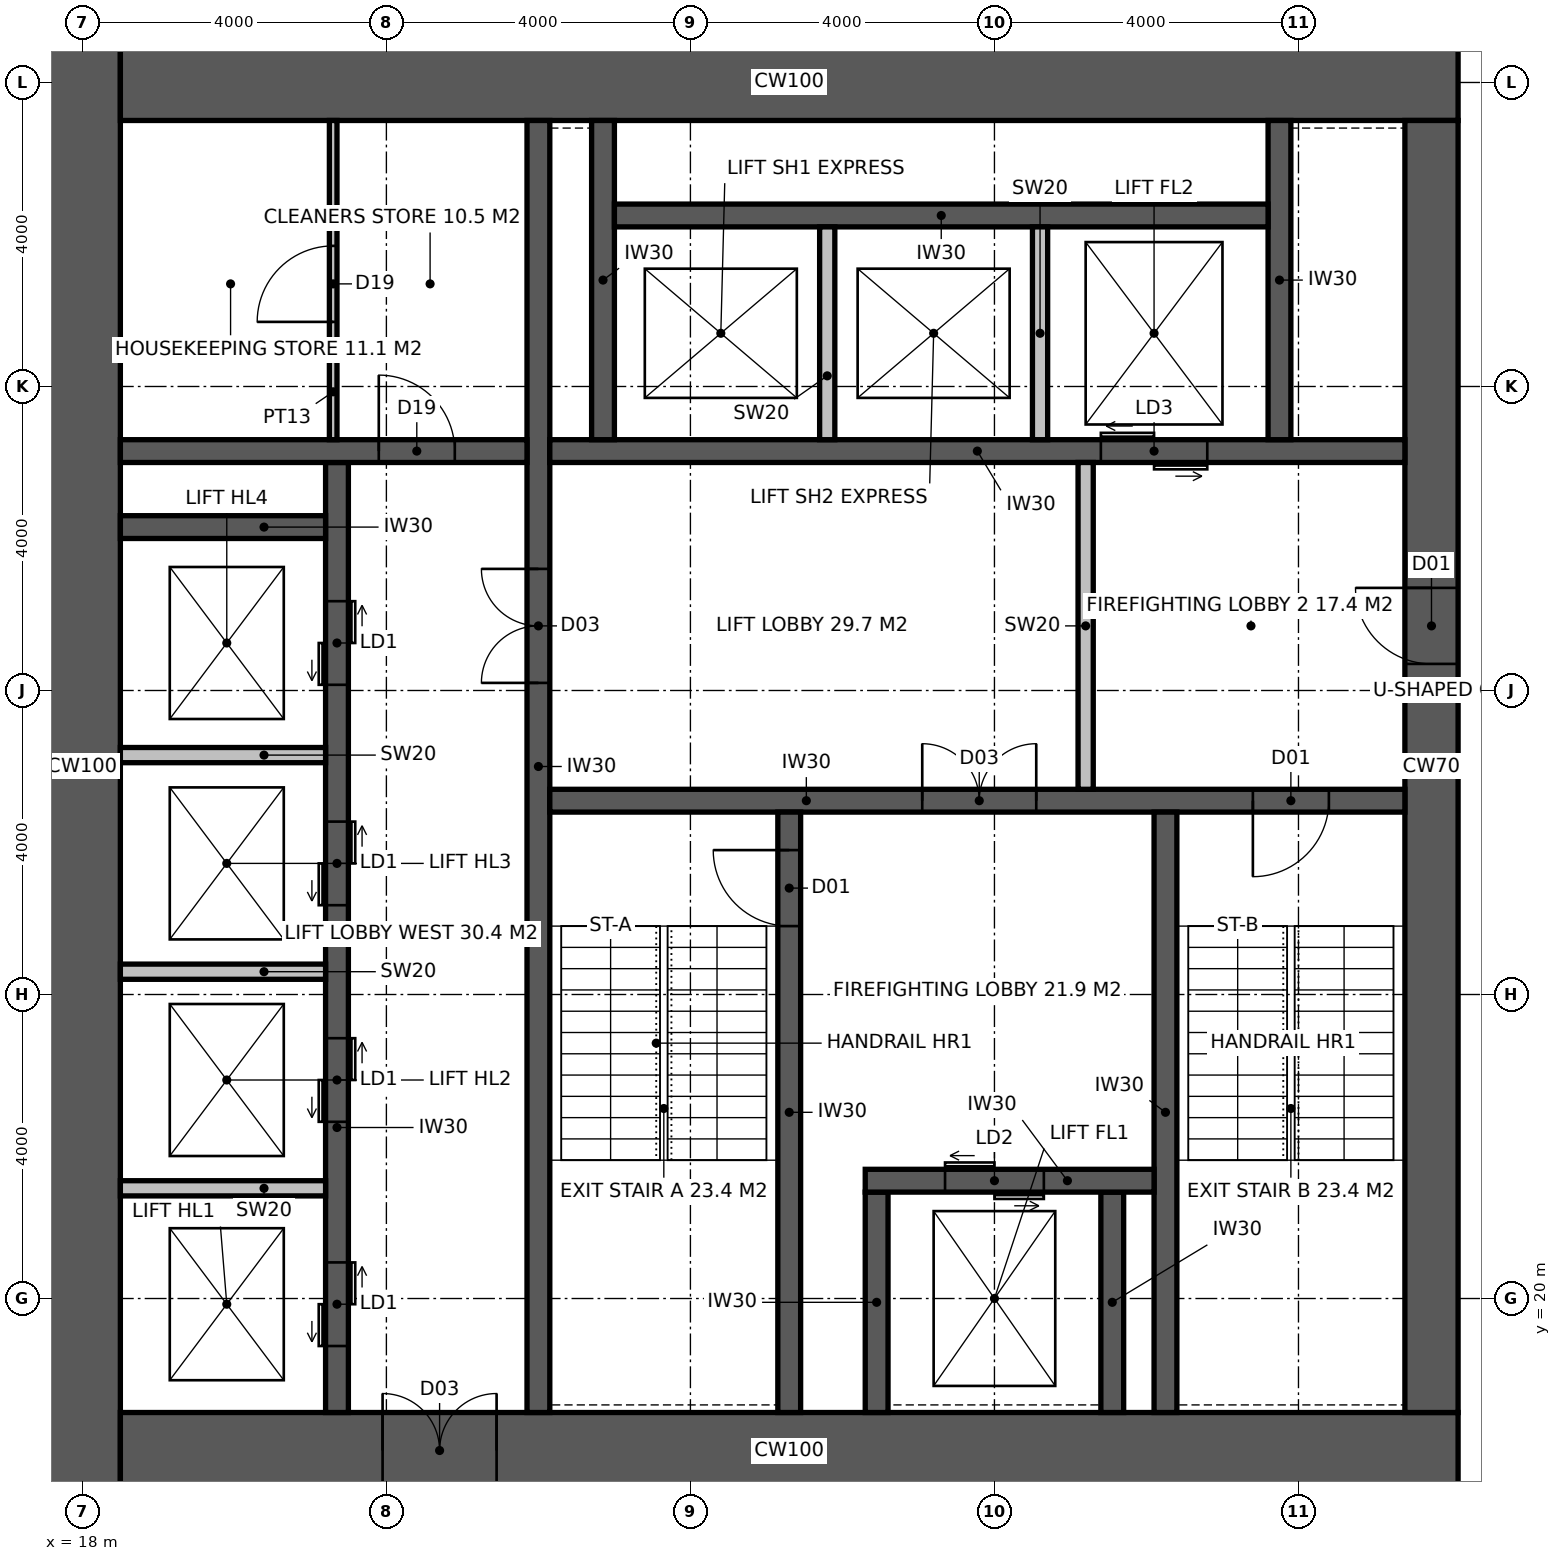
"""IFC4 building model, lengths in metres.
Left out: names, types, materials, properties, quantities, classifications, styles, units other than length and angle.
Written with IfcOpenShell. Run it as: python <this file> out.ifc"""

import sys

from ifc_helpers import new_model, si_unit, direction, frame, frame_2d, origin, place, context, subcontext, project, spatial, rectangle, extrude, element, fill, save


model = new_model("IFC4")
c1 = context("Model", 3, precision=1e-05, world=origin(), true_north=direction((0.0, 1.0)))
c2 = subcontext(c1, "Body", "Model", "MODEL_VIEW")
j1 = project(units=[si_unit("LENGTHUNIT", "METRE"), si_unit("PLANEANGLEUNIT", "RADIAN")], contexts=[c1])
p1 = place(None, origin())
s1 = spatial("IfcSite", under=j1, at=p1, CompositionType="ELEMENT")
p2 = place(p1, origin())
s2 = spatial("IfcBuilding", under=s1, at=p2, CompositionType="ELEMENT")
p3 = place(p2, frame((0.0, 0.0, 159.8)))
s3 = spatial("IfcBuildingStorey", under=s2, at=p3, CompositionType="ELEMENT", Elevation=159.8)
p4 = place(p3, frame((18.0, 17.5, -0.15), z_axis=(0.0, 0.0, 1.0), x_axis=(0.0, 1.0, 0.0)))
e1 = element("IfcWall", 1, at=p4, inside=s3, PredefinedType="SHEAR", context=c2, shape_type="SweptSolid", body=[
    extrude(rectangle(XDim=19.0, YDim=1.0, at=frame_2d((9.5, 0.0))), origin(), (0.0, 0.0, 1.0), 4.0),
])
p5 = place(p3, frame((18.5, 18.0, -0.15), z_axis=(0.0, 0.0, 1.0), x_axis=(1.0, 0.0, 0.0)))
e2 = element("IfcWall", 2, at=p5, inside=s3, PredefinedType="SHEAR", context=c2, shape_type="SweptSolid", body=[
    extrude(rectangle(XDim=17.6, YDim=1.0, at=frame_2d((8.8, 0.0))), origin(), (0.0, 0.0, 1.0), 4.0),
])
p6 = place(p5, frame((3.45, 0.0, 0.15)))
e3 = element("IfcOpeningElement", 3, at=p6, cuts=e2, PredefinedType="OPENING", context=c2, shape_type="SweptSolid", body=[
    extrude(rectangle(XDim=1.5, YDim=2.4, at=frame_2d((0.75, 1.2))), frame((0.0, 0.51, 0.0), z_axis=(0.0, -1.0, 0.0), x_axis=(1.0, 0.0, 0.0)), (0.0, 0.0, 1.0), 1.02),
])
p7 = place(p3, frame((18.5, 36.0, -0.15), z_axis=(0.0, 0.0, 1.0), x_axis=(1.0, 0.0, 0.0)))
e4 = element("IfcWall", 4, at=p7, inside=s3, PredefinedType="SHEAR", context=c2, shape_type="SweptSolid", body=[
    extrude(rectangle(XDim=17.6, YDim=1.0, at=frame_2d((8.8, 0.0))), origin(), (0.0, 0.0, 1.0), 4.0),
])
p8 = place(p3, frame((35.75, 18.5, -0.15), z_axis=(0.0, 0.0, 1.0), x_axis=(0.0, 1.0, 0.0)))
e5 = element("IfcWall", 5, at=p8, inside=s3, PredefinedType="SHEAR", context=c2, shape_type="SweptSolid", body=[
    extrude(rectangle(XDim=17.0, YDim=0.7, at=frame_2d((8.5, 0.0))), origin(), (0.0, 0.0, 1.0), 4.0),
])
p9 = place(p8, frame((9.85, 0.0, 0.15)))
e6 = element("IfcOpeningElement", 6, at=p9, cuts=e5, PredefinedType="OPENING", context=c2, shape_type="SweptSolid", body=[
    extrude(rectangle(XDim=1.0, YDim=2.2, at=frame_2d((0.5, 1.1))), frame((0.0, 0.36, 0.0), z_axis=(0.0, -1.0, 0.0), x_axis=(1.0, 0.0, 0.0)), (0.0, 0.0, 1.0), 0.72),
])
p10 = place(p3, frame((24.0, 18.5, -0.15), z_axis=(0.0, 0.0, 1.0), x_axis=(0.0, 1.0, 0.0)))
e7 = element("IfcWall", 7, at=p10, inside=s3, PredefinedType="SHEAR", context=c2, shape_type="SweptSolid", body=[
    extrude(rectangle(XDim=17.0, YDim=0.3, at=frame_2d((8.5, 0.0))), origin(), (0.0, 0.0, 1.0), 4.0),
])
p11 = place(p10, frame((9.6, 0.0, 0.15)))
e8 = element("IfcOpeningElement", 8, at=p11, cuts=e7, PredefinedType="OPENING", context=c2, shape_type="SweptSolid", body=[
    extrude(rectangle(XDim=1.5, YDim=2.4, at=frame_2d((0.75, 1.2))), frame((0.0, 0.16, 0.0), z_axis=(0.0, -1.0, 0.0), x_axis=(1.0, 0.0, 0.0)), (0.0, 0.0, 1.0), 0.32),
])
p12 = place(p3, frame((24.15, 26.55, -0.15), z_axis=(0.0, 0.0, 1.0), x_axis=(1.0, 0.0, 0.0)))
e9 = element("IfcWall", 9, at=p12, inside=s3, PredefinedType="SHEAR", context=c2, shape_type="SweptSolid", body=[
    extrude(rectangle(XDim=11.25, YDim=0.3, at=frame_2d((5.625, 0.0))), origin(), (0.0, 0.0, 1.0), 4.0),
])
p13 = place(p12, frame((9.25, 0.0, 0.15)))
e10 = element("IfcOpeningElement", 10, at=p13, cuts=e9, PredefinedType="OPENING", context=c2, shape_type="SweptSolid", body=[
    extrude(rectangle(XDim=1.0, YDim=2.2, at=frame_2d((0.5, 1.1))), frame((0.0, 0.16, 0.0), z_axis=(0.0, -1.0, 0.0), x_axis=(1.0, 0.0, 0.0)), (0.0, 0.0, 1.0), 0.32),
])
p14 = place(p12, frame((4.9, 0.0, 0.15)))
e11 = element("IfcOpeningElement", 11, at=p14, cuts=e9, PredefinedType="OPENING", context=c2, shape_type="SweptSolid", body=[
    extrude(rectangle(XDim=1.5, YDim=2.4, at=frame_2d((0.75, 1.2))), frame((0.0, 0.16, 0.0), z_axis=(0.0, -1.0, 0.0), x_axis=(1.0, 0.0, 0.0)), (0.0, 0.0, 1.0), 0.32),
])
p15 = place(p3, frame((27.3, 18.5, -0.15), z_axis=(0.0, 0.0, 1.0), x_axis=(0.0, 1.0, 0.0)))
e12 = element("IfcWall", 12, at=p15, inside=s3, PredefinedType="SHEAR", context=c2, shape_type="SweptSolid", body=[
    extrude(rectangle(XDim=7.9, YDim=0.3, at=frame_2d((3.95, 0.0))), origin(), (0.0, 0.0, 1.0), 4.0),
])
p16 = place(p15, frame((6.4, 0.0, 0.15)))
e13 = element("IfcOpeningElement", 13, at=p16, cuts=e12, PredefinedType="OPENING", context=c2, shape_type="SweptSolid", body=[
    extrude(rectangle(XDim=1.0, YDim=2.2, at=frame_2d((0.5, 1.1))), frame((0.0, 0.16, 0.0), z_axis=(0.0, -1.0, 0.0), x_axis=(1.0, 0.0, 0.0)), (0.0, 0.0, 1.0), 0.32),
])
p17 = place(p3, frame((32.25, 18.5, -0.15), z_axis=(0.0, 0.0, 1.0), x_axis=(0.0, 1.0, 0.0)))
e14 = element("IfcWall", 14, at=p17, inside=s3, PredefinedType="SHEAR", context=c2, shape_type="SweptSolid", body=[
    extrude(rectangle(XDim=7.9, YDim=0.3, at=frame_2d((3.95, 0.0))), origin(), (0.0, 0.0, 1.0), 4.0),
])
for number, where, z_axis, x_axis in (
    (15, (28.45, 18.5, -0.15), (0.0, 0.0, 1.0), (0.0, 1.0, 0.0)),
    (16, (31.55, 18.5, -0.15), (0.0, 0.0, 1.0), (0.0, 1.0, 0.0)),
):
    element("IfcWall", number, at=place(p3, frame(where, z_axis=z_axis, x_axis=x_axis)), inside=s3, PredefinedType="SHEAR", context=c2, shape_type="SweptSolid", body=[
        extrude(rectangle(XDim=2.9, YDim=0.3, at=frame_2d((1.45, 0.0))), origin(), (0.0, 0.0, 1.0), 4.0),
    ])
p18 = place(p3, frame((28.3, 21.55, -0.15), z_axis=(0.0, 0.0, 1.0), x_axis=(1.0, 0.0, 0.0)))
e17 = element("IfcWall", 17, at=p18, inside=s3, PredefinedType="SHEAR", context=c2, shape_type="SweptSolid", body=[
    extrude(rectangle(XDim=3.8, YDim=0.3, at=frame_2d((1.9, 0.0))), origin(), (0.0, 0.0, 1.0), 4.0),
])
p19 = place(p18, frame((1.05, 0.0, 0.15)))
e18 = element("IfcOpeningElement", 18, at=p19, cuts=e17, PredefinedType="OPENING", context=c2, shape_type="SweptSolid", body=[
    extrude(rectangle(XDim=1.3, YDim=2.4, at=frame_2d((0.65, 1.2))), frame((0.0, 0.16, 0.0), z_axis=(0.0, -1.0, 0.0), x_axis=(1.0, 0.0, 0.0)), (0.0, 0.0, 1.0), 0.32),
])
p20 = place(p3, frame((24.15, 31.15, -0.15), z_axis=(0.0, 0.0, 1.0), x_axis=(1.0, 0.0, 0.0)))
e19 = element("IfcWall", 19, at=p20, inside=s3, PredefinedType="SHEAR", context=c2, shape_type="SweptSolid", body=[
    extrude(rectangle(XDim=11.25, YDim=0.3, at=frame_2d((5.625, 0.0))), origin(), (0.0, 0.0, 1.0), 4.0),
])
p21 = place(p20, frame((7.25, 0.0, 0.15)))
e20 = element("IfcOpeningElement", 20, at=p21, cuts=e19, PredefinedType="OPENING", context=c2, shape_type="SweptSolid", body=[
    extrude(rectangle(XDim=1.4, YDim=2.4, at=frame_2d((0.7, 1.2))), frame((0.0, 0.16, 0.0), z_axis=(0.0, -1.0, 0.0), x_axis=(1.0, 0.0, 0.0)), (0.0, 0.0, 1.0), 0.32),
])
p22 = place(p3, frame((21.35, 18.5, -0.15), z_axis=(0.0, 0.0, 1.0), x_axis=(0.0, 1.0, 0.0)))
e21 = element("IfcWall", 21, at=p22, inside=s3, PredefinedType="SHEAR", context=c2, shape_type="SweptSolid", body=[
    extrude(rectangle(XDim=12.5, YDim=0.3, at=frame_2d((6.25, 0.0))), origin(), (0.0, 0.0, 1.0), 4.0),
])
p23 = place(p22, frame((0.875, 0.0, 0.15)))
e22 = element("IfcOpeningElement", 22, at=p23, cuts=e21, PredefinedType="OPENING", context=c2, shape_type="SweptSolid", body=[
    extrude(rectangle(XDim=1.1, YDim=2.2, at=frame_2d((0.55, 1.1))), frame((0.0, 0.16, 0.0), z_axis=(0.0, -1.0, 0.0), x_axis=(1.0, 0.0, 0.0)), (0.0, 0.0, 1.0), 0.32),
])
p24 = place(p22, frame((3.825, 0.0, 0.15)))
e23 = element("IfcOpeningElement", 23, at=p24, cuts=e21, PredefinedType="OPENING", context=c2, shape_type="SweptSolid", body=[
    extrude(rectangle(XDim=1.1, YDim=2.2, at=frame_2d((0.55, 1.1))), frame((0.0, 0.16, 0.0), z_axis=(0.0, -1.0, 0.0), x_axis=(1.0, 0.0, 0.0)), (0.0, 0.0, 1.0), 0.32),
])
p25 = place(p22, frame((6.675, 0.0, 0.15)))
e24 = element("IfcOpeningElement", 24, at=p25, cuts=e21, PredefinedType="OPENING", context=c2, shape_type="SweptSolid", body=[
    extrude(rectangle(XDim=1.1, YDim=2.2, at=frame_2d((0.55, 1.1))), frame((0.0, 0.16, 0.0), z_axis=(0.0, -1.0, 0.0), x_axis=(1.0, 0.0, 0.0)), (0.0, 0.0, 1.0), 0.32),
])
p26 = place(p22, frame((9.575, 0.0, 0.15)))
e25 = element("IfcOpeningElement", 25, at=p26, cuts=e21, PredefinedType="OPENING", context=c2, shape_type="SweptSolid", body=[
    extrude(rectangle(XDim=1.1, YDim=2.2, at=frame_2d((0.55, 1.1))), frame((0.0, 0.16, 0.0), z_axis=(0.0, -1.0, 0.0), x_axis=(1.0, 0.0, 0.0)), (0.0, 0.0, 1.0), 0.32),
])
p27 = place(p3, frame((18.5, 31.15, -0.15), z_axis=(0.0, 0.0, 1.0), x_axis=(1.0, 0.0, 0.0)))
e26 = element("IfcWall", 26, at=p27, inside=s3, PredefinedType="SHEAR", context=c2, shape_type="SweptSolid", body=[
    extrude(rectangle(XDim=5.35, YDim=0.3, at=frame_2d((2.675, 0.0))), origin(), (0.0, 0.0, 1.0), 4.0),
])
p28 = place(p27, frame((3.4, 0.0, 0.15)))
e27 = element("IfcOpeningElement", 27, at=p28, cuts=e26, PredefinedType="OPENING", context=c2, shape_type="SweptSolid", body=[
    extrude(rectangle(XDim=1.0, YDim=2.2, at=frame_2d((0.5, 1.1))), frame((0.0, 0.16, 0.0), z_axis=(0.0, -1.0, 0.0), x_axis=(1.0, 0.0, 0.0)), (0.0, 0.0, 1.0), 0.32),
])
p29 = place(p3, frame((18.5, 30.15, -0.15), z_axis=(0.0, 0.0, 1.0), x_axis=(1.0, 0.0, 0.0)))
e28 = element("IfcWall", 28, at=p29, inside=s3, PredefinedType="SHEAR", context=c2, shape_type="SweptSolid", body=[
    extrude(rectangle(XDim=2.7, YDim=0.3, at=frame_2d((1.35, 0.0))), origin(), (0.0, 0.0, 1.0), 4.0),
])
for number, where, z_axis, x_axis in (
    (29, (24.85, 31.3, -0.15), (0.0, 0.0, 1.0), (0.0, 1.0, 0.0)),
    (30, (33.75, 31.3, -0.15), (0.0, 0.0, 1.0), (0.0, 1.0, 0.0)),
):
    element("IfcWall", number, at=place(p3, frame(where, z_axis=z_axis, x_axis=x_axis)), inside=s3, PredefinedType="SHEAR", context=c2, shape_type="SweptSolid", body=[
        extrude(rectangle(XDim=4.2, YDim=0.3, at=frame_2d((2.1, 0.0))), origin(), (0.0, 0.0, 1.0), 4.0),
    ])
p30 = place(p3, frame((25.0, 34.25, -0.15), z_axis=(0.0, 0.0, 1.0), x_axis=(1.0, 0.0, 0.0)))
e31 = element("IfcWall", 31, at=p30, inside=s3, PredefinedType="SHEAR", context=c2, shape_type="SweptSolid", body=[
    extrude(rectangle(XDim=8.6, YDim=0.3, at=frame_2d((4.3, 0.0))), origin(), (0.0, 0.0, 1.0), 4.0),
])
for number, where, z_axis, x_axis in (
    (32, (27.8, 31.3, -0.15), (0.0, 0.0, 1.0), (0.0, 1.0, 0.0)),
    (33, (30.6, 31.3, -0.15), (0.0, 0.0, 1.0), (0.0, 1.0, 0.0)),
):
    element("IfcWall", number, at=place(p3, frame(where, z_axis=z_axis, x_axis=x_axis)), inside=s3, PredefinedType="SOLIDWALL", context=c2, shape_type="SweptSolid", body=[
        extrude(rectangle(XDim=2.8, YDim=0.2, at=frame_2d((1.4, 0.0))), origin(), (0.0, 0.0, 1.0), 4.0),
    ])
for number, where, z_axis, x_axis in (
    (34, (18.5, 21.45, -0.15), (0.0, 0.0, 1.0), (1.0, 0.0, 0.0)),
    (35, (18.5, 24.3, -0.15), (0.0, 0.0, 1.0), (1.0, 0.0, 0.0)),
    (36, (18.5, 27.15, -0.15), (0.0, 0.0, 1.0), (1.0, 0.0, 0.0)),
):
    element("IfcWall", number, at=place(p3, frame(where, z_axis=z_axis, x_axis=x_axis)), inside=s3, PredefinedType="SOLIDWALL", context=c2, shape_type="SweptSolid", body=[
        extrude(rectangle(XDim=2.7, YDim=0.2, at=frame_2d((1.35, 0.0))), origin(), (0.0, 0.0, 1.0), 4.0),
    ])
p31 = place(p3, frame((31.2, 26.7, 0.0), z_axis=(0.0, 0.0, 1.0), x_axis=(0.0, 1.0, 0.0)))
e37 = element("IfcWall", 37, at=p31, inside=s3, PredefinedType="SOLIDWALL", context=c2, shape_type="SweptSolid", body=[
    extrude(rectangle(XDim=4.3, YDim=0.2, at=frame_2d((2.15, 0.0))), origin(), (0.0, 0.0, 1.0), 3.85),
])
p32 = place(p3, frame((21.3, 31.3, 0.0), z_axis=(0.0, 0.0, 1.0), x_axis=(0.0, 1.0, 0.0)))
e38 = element("IfcWall", 38, at=p32, inside=s3, PredefinedType="PARTITIONING", context=c2, shape_type="SweptSolid", body=[
    extrude(rectangle(XDim=4.2, YDim=0.1, at=frame_2d((2.1, 0.0))), origin(), (0.0, 0.0, 1.0), 3.85),
])
p33 = place(p32, frame((1.55, 0.0, 0.0)))
e39 = element("IfcOpeningElement", 39, at=p33, cuts=e38, PredefinedType="OPENING", context=c2, shape_type="SweptSolid", body=[
    extrude(rectangle(XDim=1.0, YDim=2.2, at=frame_2d((0.5, 1.1))), frame((0.0, 0.06, 0.0), z_axis=(0.0, -1.0, 0.0), x_axis=(1.0, 0.0, 0.0)), (0.0, 0.0, 1.0), 0.12),
])
p34 = place(p16, origin())
e40 = element("IfcDoor", 40, at=p34, inside=s3, OperationType="SINGLE_SWING_RIGHT", PredefinedType="DOOR", context=c2, shape_type="SweptSolid", body=[
    extrude(rectangle(XDim=1.0, YDim=2.2, at=frame_2d((0.5, 1.1))), frame((0.0, 0.025, 0.0), z_axis=(0.0, -1.0, 0.0), x_axis=(1.0, 0.0, 0.0)), (0.0, 0.0, 1.0), 0.05),
])
fill(e13, e40)
p35 = place(p13, frame((1.0, 0.0, 0.0), z_axis=(0.0, 0.0, 1.0), x_axis=(-1.0, 0.0, 0.0)))
e41 = element("IfcDoor", 41, at=p35, inside=s3, OperationType="SINGLE_SWING_RIGHT", PredefinedType="DOOR", context=c2, shape_type="SweptSolid", body=[
    extrude(rectangle(XDim=1.0, YDim=2.2, at=frame_2d((0.5, 1.1))), frame((0.0, 0.025, 0.0), z_axis=(0.0, -1.0, 0.0), x_axis=(1.0, 0.0, 0.0)), (0.0, 0.0, 1.0), 0.05),
])
fill(e10, e41)
p36 = place(p9, origin())
e42 = element("IfcDoor", 42, at=p36, inside=s3, OperationType="SINGLE_SWING_RIGHT", PredefinedType="DOOR", context=c2, shape_type="SweptSolid", body=[
    extrude(rectangle(XDim=1.0, YDim=2.2, at=frame_2d((0.5, 1.1))), frame((0.0, 0.025, 0.0), z_axis=(0.0, -1.0, 0.0), x_axis=(1.0, 0.0, 0.0)), (0.0, 0.0, 1.0), 0.05),
])
fill(e6, e42)
p37 = place(p14, origin())
e43 = element("IfcDoor", 43, at=p37, inside=s3, OperationType="DOUBLE_DOOR_DOUBLE_SWING", PredefinedType="DOOR", context=c2, shape_type="SweptSolid", body=[
    extrude(rectangle(XDim=1.5, YDim=2.4, at=frame_2d((0.75, 1.2))), frame((0.0, 0.025, 0.0), z_axis=(0.0, -1.0, 0.0), x_axis=(1.0, 0.0, 0.0)), (0.0, 0.0, 1.0), 0.05),
])
fill(e11, e43)
p38 = place(p11, origin())
e44 = element("IfcDoor", 44, at=p38, inside=s3, OperationType="DOUBLE_DOOR_DOUBLE_SWING", PredefinedType="DOOR", context=c2, shape_type="SweptSolid", body=[
    extrude(rectangle(XDim=1.5, YDim=2.4, at=frame_2d((0.75, 1.2))), frame((0.0, 0.025, 0.0), z_axis=(0.0, -1.0, 0.0), x_axis=(1.0, 0.0, 0.0)), (0.0, 0.0, 1.0), 0.05),
])
fill(e8, e44)
p39 = place(p28, origin())
e45 = element("IfcDoor", 45, at=p39, inside=s3, OperationType="SINGLE_SWING_LEFT", PredefinedType="DOOR", context=c2, shape_type="SweptSolid", body=[
    extrude(rectangle(XDim=1.0, YDim=2.2, at=frame_2d((0.5, 1.1))), frame((0.0, 0.025, 0.0), z_axis=(0.0, -1.0, 0.0), x_axis=(1.0, 0.0, 0.0)), (0.0, 0.0, 1.0), 0.05),
])
fill(e27, e45)
p40 = place(p33, origin())
e46 = element("IfcDoor", 46, at=p40, inside=s3, OperationType="SINGLE_SWING_LEFT", PredefinedType="DOOR", context=c2, shape_type="SweptSolid", body=[
    extrude(rectangle(XDim=1.0, YDim=2.2, at=frame_2d((0.5, 1.1))), frame((0.0, 0.025, 0.0), z_axis=(0.0, -1.0, 0.0), x_axis=(1.0, 0.0, 0.0)), (0.0, 0.0, 1.0), 0.05),
])
fill(e39, e46)
p41 = place(p6, origin())
e47 = element("IfcDoor", 47, at=p41, inside=s3, OperationType="DOUBLE_DOOR_DOUBLE_SWING", PredefinedType="DOOR", context=c2, shape_type="SweptSolid", body=[
    extrude(rectangle(XDim=1.5, YDim=2.4, at=frame_2d((0.75, 1.2))), frame((0.0, 0.025, 0.0), z_axis=(0.0, -1.0, 0.0), x_axis=(1.0, 0.0, 0.0)), (0.0, 0.0, 1.0), 0.05),
])
fill(e3, e47)
p42 = place(p19, origin())
e48 = element("IfcDoor", 48, at=p42, inside=s3, OperationType="DOUBLE_DOOR_SLIDING", PredefinedType="DOOR", context=c2, shape_type="SweptSolid", body=[
    extrude(rectangle(XDim=1.3, YDim=2.4, at=frame_2d((0.65, 1.2))), frame((0.0, 0.025, 0.0), z_axis=(0.0, -1.0, 0.0), x_axis=(1.0, 0.0, 0.0)), (0.0, 0.0, 1.0), 0.05),
])
fill(e18, e48)
p43 = place(p21, origin())
e49 = element("IfcDoor", 49, at=p43, inside=s3, OperationType="DOUBLE_DOOR_SLIDING", PredefinedType="DOOR", context=c2, shape_type="SweptSolid", body=[
    extrude(rectangle(XDim=1.4, YDim=2.4, at=frame_2d((0.7, 1.2))), frame((0.0, 0.025, 0.0), z_axis=(0.0, -1.0, 0.0), x_axis=(1.0, 0.0, 0.0)), (0.0, 0.0, 1.0), 0.05),
])
fill(e20, e49)
p44 = place(p23, origin())
e50 = element("IfcDoor", 50, at=p44, inside=s3, OperationType="DOUBLE_DOOR_SLIDING", PredefinedType="DOOR", context=c2, shape_type="SweptSolid", body=[
    extrude(rectangle(XDim=1.1, YDim=2.2, at=frame_2d((0.55, 1.1))), frame((0.0, 0.025, 0.0), z_axis=(0.0, -1.0, 0.0), x_axis=(1.0, 0.0, 0.0)), (0.0, 0.0, 1.0), 0.05),
])
fill(e22, e50)
p45 = place(p24, origin())
e51 = element("IfcDoor", 51, at=p45, inside=s3, OperationType="DOUBLE_DOOR_SLIDING", PredefinedType="DOOR", context=c2, shape_type="SweptSolid", body=[
    extrude(rectangle(XDim=1.1, YDim=2.2, at=frame_2d((0.55, 1.1))), frame((0.0, 0.025, 0.0), z_axis=(0.0, -1.0, 0.0), x_axis=(1.0, 0.0, 0.0)), (0.0, 0.0, 1.0), 0.05),
])
fill(e23, e51)
p46 = place(p25, origin())
e52 = element("IfcDoor", 52, at=p46, inside=s3, OperationType="DOUBLE_DOOR_SLIDING", PredefinedType="DOOR", context=c2, shape_type="SweptSolid", body=[
    extrude(rectangle(XDim=1.1, YDim=2.2, at=frame_2d((0.55, 1.1))), frame((0.0, 0.025, 0.0), z_axis=(0.0, -1.0, 0.0), x_axis=(1.0, 0.0, 0.0)), (0.0, 0.0, 1.0), 0.05),
])
fill(e24, e52)
p47 = place(p26, origin())
e53 = element("IfcDoor", 53, at=p47, inside=s3, OperationType="DOUBLE_DOOR_SLIDING", PredefinedType="DOOR", context=c2, shape_type="SweptSolid", body=[
    extrude(rectangle(XDim=1.1, YDim=2.2, at=frame_2d((0.55, 1.1))), frame((0.0, 0.025, 0.0), z_axis=(0.0, -1.0, 0.0), x_axis=(1.0, 0.0, 0.0)), (0.0, 0.0, 1.0), 0.05),
])
fill(e25, e53)
save(model, sys.argv[1])
